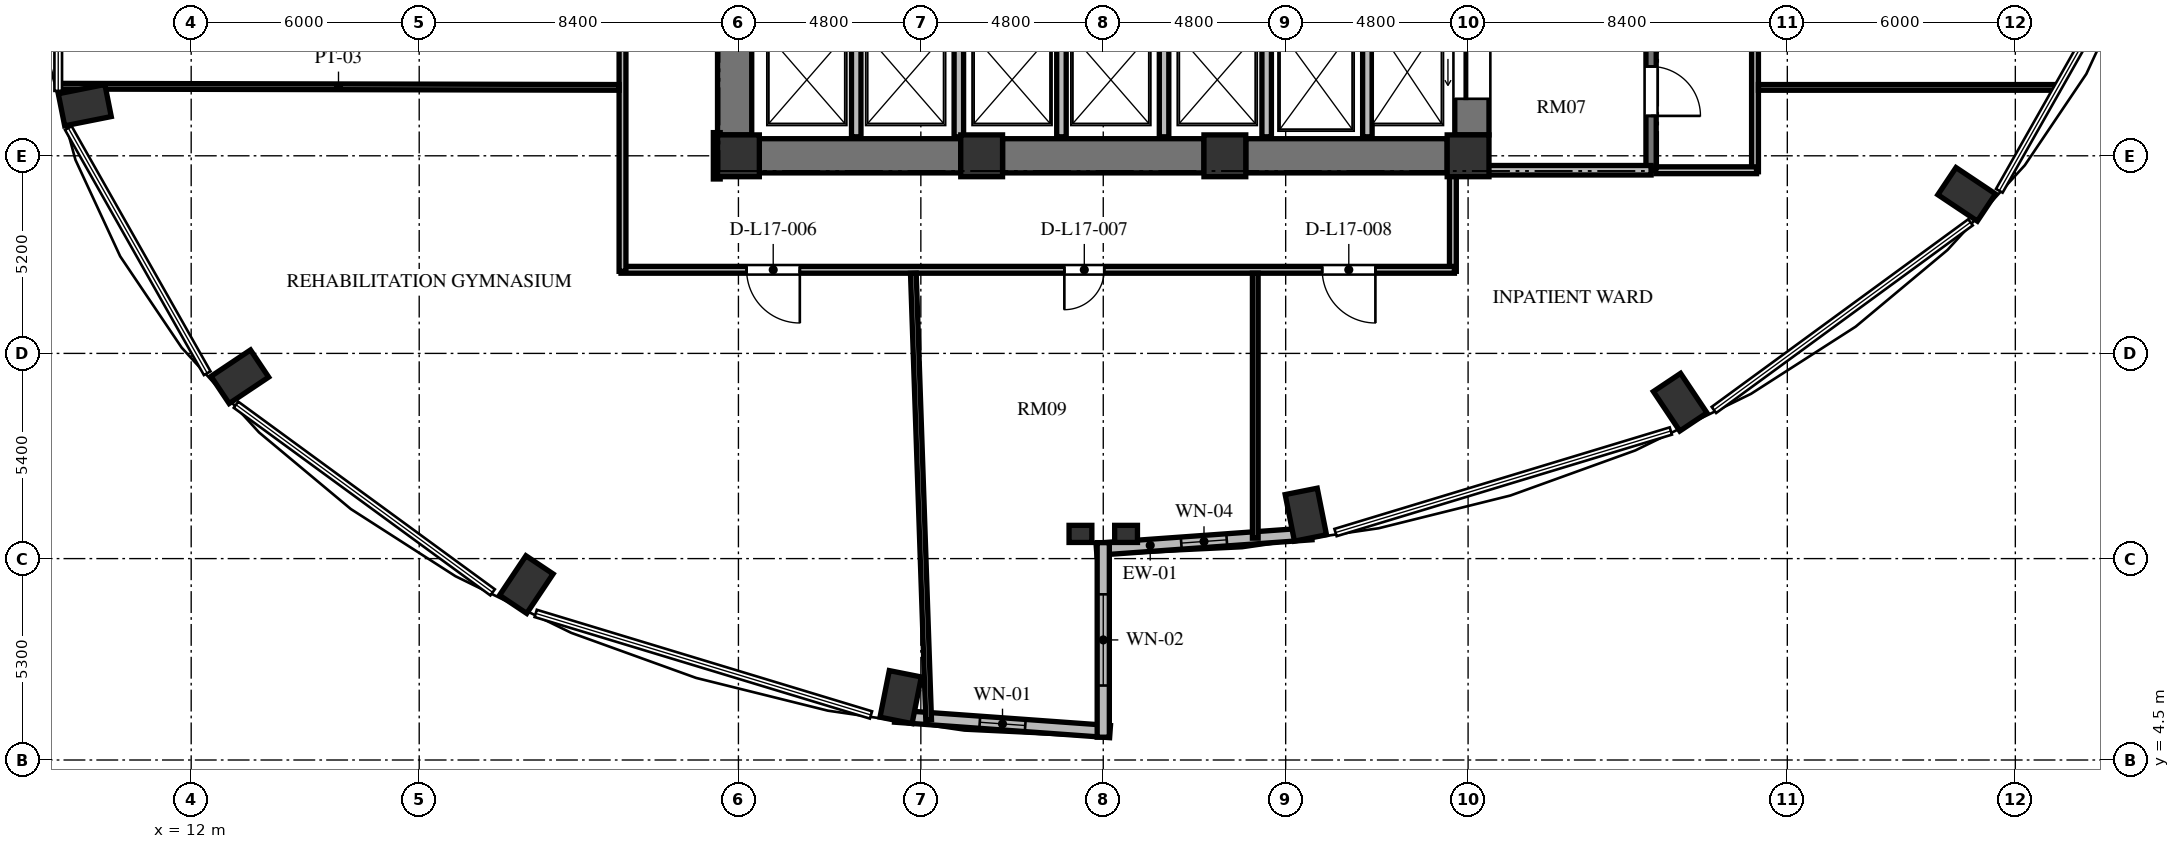
"""IFC4 building model, lengths in metres.
Left out: names, types, materials, properties, quantities, classifications, styles, units other than length and angle.
Written with IfcOpenShell. Run it as: python <this file> out.ifc"""

import sys

from ifc_helpers import new_model, si_unit, direction, frame, frame_2d, origin, origin_2d, place, context, subcontext, project, spatial, rectangle, extrude, element, fill, save


model = new_model("IFC4")
c1 = context("Model", 3, precision=1e-05, world=origin(), true_north=direction((0.0, 1.0)))
c2 = subcontext(c1, "Body", "Model", "MODEL_VIEW")
j1 = project(units=[si_unit("LENGTHUNIT", "METRE"), si_unit("PLANEANGLEUNIT", "RADIAN")], contexts=[c1])
p1 = place(None, origin())
s1 = spatial("IfcSite", under=j1, at=p1, CompositionType="ELEMENT")
p2 = place(p1, origin())
s2 = spatial("IfcBuilding", under=s1, at=p2, CompositionType="ELEMENT")
p3 = place(p2, frame((0.0, 0.0, 68.976)))
s3 = spatial("IfcBuildingStorey", under=s2, at=p3, CompositionType="ELEMENT", Elevation=68.976)
for number, where, z_axis, x_axis in (
    (1, (41.331, 10.956, 0.0), (0.0, 0.0, 1.0), (0.195, -0.981, 0.0)),
    (2, (51.181, 13.916, 0.0), (0.0, 0.0, 1.0), (0.556, -0.831, 0.0)),
    (3, (58.72, 19.386, 0.0), (0.0, 0.0, 1.0), (0.831, -0.556, 0.0)),
    (4, (9.2, 21.732, 0.0), (0.0, 0.0, 1.0), (-0.981, -0.195, 0.0)),
    (5, (13.28, 14.586, 0.0), (0.0, 0.0, 1.0), (-0.831, -0.556, 0.0)),
    (6, (20.819, 9.116, 0.0), (0.0, 0.0, 1.0), (-0.556, -0.831, 0.0)),
    (7, (30.669, 6.156, 0.0), (0.0, 0.0, 1.0), (-0.195, -0.981, 0.0)),
):
    element("IfcColumn", number, at=place(p3, frame(where, z_axis=z_axis, x_axis=x_axis)), inside=s3, PredefinedType="COLUMN", context=c2, shape_type="SweptSolid", body=[
        extrude(rectangle(XDim=1.25, YDim=0.86, at=origin_2d()), origin(), (0.0, 0.0, 1.0), 3.648),
    ])
for number, where, z_axis, x_axis in (
    (8, (26.4, 20.4, 0.0), (0.0, 0.0, 1.0), (1.0, 0.0, 0.0)),
    (9, (32.8, 20.4, 0.0), (0.0, 0.0, 1.0), (1.0, 0.0, 0.0)),
    (10, (39.2, 20.4, 0.0), (0.0, 0.0, 1.0), (1.0, 0.0, 0.0)),
    (11, (45.6, 20.4, 0.0), (0.0, 0.0, 1.0), (1.0, 0.0, 0.0)),
):
    element("IfcColumn", number, at=place(p3, frame(where, z_axis=z_axis, x_axis=x_axis)), inside=s3, PredefinedType="COLUMN", context=c2, shape_type="SweptSolid", body=[
        extrude(rectangle(XDim=1.1, YDim=1.1, at=origin_2d()), origin(), (0.0, 0.0, 1.0), 3.648),
    ])
for number, where, z_axis, x_axis in (
    (12, (35.4, 10.45, 0.0), (0.0, 0.0, 1.0), (1.0, 0.0, 0.0)),
    (13, (36.6, 10.45, 0.0), (0.0, 0.0, 1.0), (1.0, 0.0, 0.0)),
):
    element("IfcColumn", number, at=place(p3, frame(where, z_axis=z_axis, x_axis=x_axis)), inside=s3, PredefinedType="PILASTER", context=c2, shape_type="SweptSolid", body=[
        extrude(rectangle(XDim=0.6, YDim=0.45, at=origin_2d()), origin(), (0.0, 0.0, 1.0), 3.648),
    ])
p4 = place(p3, frame((26.3, 20.95, 0.0), z_axis=(0.0, 0.0, 1.0), x_axis=(0.0, 1.0, 0.0)))
e14 = element("IfcWall", 14, at=p4, inside=s3, PredefinedType="SHEAR", context=c2, shape_type="SweptSolid", body=[
    extrude(rectangle(XDim=14.1, YDim=0.9, at=frame_2d((7.05, 0.0))), origin(), (0.0, 0.0, 1.0), 3.648),
])
p5 = place(p4, frame((6.5, 0.0, 0.0)))
e15 = element("IfcOpeningElement", 15, at=p5, cuts=e14, PredefinedType="OPENING", context=c2, shape_type="SweptSolid", body=[
    extrude(rectangle(XDim=1.2, YDim=2.15, at=frame_2d((0.6, 1.075))), frame((0.0, 0.46, 0.0), z_axis=(0.0, -1.0, 0.0), x_axis=(1.0, 0.0, 0.0)), (0.0, 0.0, 1.0), 0.92),
])
p6 = place(p4, frame((9.6, 0.0, 0.0)))
e16 = element("IfcOpeningElement", 16, at=p6, cuts=e14, PredefinedType="OPENING", context=c2, shape_type="SweptSolid", body=[
    extrude(rectangle(XDim=1.3, YDim=2.2, at=frame_2d((0.65, 1.1))), frame((0.0, 0.46, 0.0), z_axis=(0.0, -1.0, 0.0), x_axis=(1.0, 0.0, 0.0)), (0.0, 0.0, 1.0), 0.92),
])
p7 = place(p4, frame((3.26, 0.0, 0.0)))
e17 = element("IfcOpeningElement", 17, at=p7, cuts=e14, PredefinedType="OPENING", context=c2, shape_type="SweptSolid", body=[
    extrude(rectangle(XDim=1.3, YDim=2.2, at=frame_2d((0.65, 1.1))), frame((0.0, 0.46, 0.0), z_axis=(0.0, -1.0, 0.0), x_axis=(1.0, 0.0, 0.0)), (0.0, 0.0, 1.0), 0.92),
])
p8 = place(p3, frame((45.7, 20.95, 0.0), z_axis=(0.0, 0.0, 1.0), x_axis=(0.0, 1.0, 0.0)))
e18 = element("IfcWall", 18, at=p8, inside=s3, PredefinedType="SHEAR", context=c2, shape_type="SweptSolid", body=[
    extrude(rectangle(XDim=14.1, YDim=0.9, at=frame_2d((7.05, 0.0))), origin(), (0.0, 0.0, 1.0), 3.648),
])
p9 = place(p8, frame((11.75, 0.0, 0.0)))
e19 = element("IfcOpeningElement", 19, at=p9, cuts=e18, PredefinedType="OPENING", context=c2, shape_type="SweptSolid", body=[
    extrude(rectangle(XDim=1.4, YDim=2.3, at=frame_2d((0.7, 1.15))), frame((0.0, 0.46, 0.0), z_axis=(0.0, -1.0, 0.0), x_axis=(1.0, 0.0, 0.0)), (0.0, 0.0, 1.0), 0.92),
])
p10 = place(p8, frame((0.95, 0.0, 0.0)))
e20 = element("IfcOpeningElement", 20, at=p10, cuts=e18, PredefinedType="OPENING", context=c2, shape_type="SweptSolid", body=[
    extrude(rectangle(XDim=1.4, YDim=2.3, at=frame_2d((0.7, 1.15))), frame((0.0, 0.46, 0.0), z_axis=(0.0, -1.0, 0.0), x_axis=(1.0, 0.0, 0.0)), (0.0, 0.0, 1.0), 0.92),
])
p11 = place(p3, frame((26.95, 20.4, 0.0), z_axis=(0.0, 0.0, 1.0), x_axis=(1.0, 0.0, 0.0)))
e21 = element("IfcWall", 21, at=p11, inside=s3, PredefinedType="SHEAR", context=c2, shape_type="SweptSolid", body=[
    extrude(rectangle(XDim=5.3, YDim=0.9, at=frame_2d((2.65, 0.0))), origin(), (0.0, 0.0, 1.0), 3.648),
])
p12 = place(p3, frame((33.35, 20.4, 0.0), z_axis=(0.0, 0.0, 1.0), x_axis=(1.0, 0.0, 0.0)))
e22 = element("IfcWall", 22, at=p12, inside=s3, PredefinedType="SHEAR", context=c2, shape_type="SweptSolid", body=[
    extrude(rectangle(XDim=5.3, YDim=0.9, at=frame_2d((2.65, 0.0))), origin(), (0.0, 0.0, 1.0), 3.648),
])
p13 = place(p3, frame((39.75, 20.4, 0.0), z_axis=(0.0, 0.0, 1.0), x_axis=(1.0, 0.0, 0.0)))
e23 = element("IfcWall", 23, at=p13, inside=s3, PredefinedType="SHEAR", context=c2, shape_type="SweptSolid", body=[
    extrude(rectangle(XDim=5.3, YDim=0.9, at=frame_2d((2.65, 0.0))), origin(), (0.0, 0.0, 1.0), 3.648),
])
p14 = place(p3, frame((35.821, 10.047, 0.0), z_axis=(0.0, 0.0, 1.0), x_axis=(0.997422321809, 0.071754525696, 0.0)))
e24 = element("IfcWall", 24, at=p14, inside=s3, PredefinedType="SOLIDWALL", context=c2, shape_type="SweptSolid", body=[
    extrude(rectangle(XDim=5.675, YDim=0.32, at=frame_2d((2.838, 0.0))), origin(), (0.0, 0.0, 1.0), 3.428),
])
p15 = place(p14, frame((2.238, 0.0, 0.85)))
e25 = element("IfcOpeningElement", 25, at=p15, cuts=e24, PredefinedType="OPENING", context=c2, shape_type="SweptSolid", body=[
    extrude(rectangle(XDim=1.2, YDim=1.8, at=frame_2d((0.6, 0.9))), frame((0.0, 0.17, 0.0), z_axis=(0.0, -1.0, 0.0), x_axis=(1.0, 0.0, 0.0)), (0.0, 0.0, 1.0), 0.34),
])
p16 = place(p3, frame((30.519, 5.654, 0.0), z_axis=(0.0, 0.0, 1.0), x_axis=(0.997421878774, -0.071760683825, 0.0)))
e26 = element("IfcWall", 26, at=p16, inside=s3, PredefinedType="SOLIDWALL", context=c2, shape_type="SweptSolid", body=[
    extrude(rectangle(XDim=5.675, YDim=0.32, at=frame_2d((2.837, 0.0))), origin(), (0.0, 0.0, 1.0), 3.428),
])
p17 = place(p16, frame((2.237, 0.0, 0.85)))
e27 = element("IfcOpeningElement", 27, at=p17, cuts=e26, PredefinedType="OPENING", context=c2, shape_type="SweptSolid", body=[
    extrude(rectangle(XDim=1.2, YDim=2.2, at=frame_2d((0.6, 1.1))), frame((0.0, 0.17, 0.0), z_axis=(0.0, -1.0, 0.0), x_axis=(1.0, 0.0, 0.0)), (0.0, 0.0, 1.0), 0.34),
])
p18 = place(p3, frame((36.0, 5.1, 0.0), z_axis=(0.0, 0.0, 1.0), x_axis=(0.0, 1.0, 0.0)))
e28 = element("IfcWall", 28, at=p18, inside=s3, PredefinedType="SOLIDWALL", context=c2, shape_type="SweptSolid", body=[
    extrude(rectangle(XDim=5.12, YDim=0.32, at=frame_2d((2.56, 0.0))), origin(), (0.0, 0.0, 1.0), 3.428),
])
p19 = place(p18, frame((1.36, 0.0, 0.84)))
e29 = element("IfcOpeningElement", 29, at=p19, cuts=e28, PredefinedType="OPENING", context=c2, shape_type="SweptSolid", body=[
    extrude(rectangle(XDim=2.4, YDim=2.04, at=frame_2d((1.2, 1.02))), frame((0.0, 0.17, 0.0), z_axis=(0.0, -1.0, 0.0), x_axis=(1.0, 0.0, 0.0)), (0.0, 0.0, 1.0), 0.34),
])
p20 = place(p3, frame((42.95, 20.9, 0.0), z_axis=(0.0, 0.0, 1.0), x_axis=(0.0, 1.0, 0.0)))
e30 = element("IfcWall", 30, at=p20, inside=s3, PredefinedType="SOLIDWALL", context=c2, shape_type="SweptSolid", body=[
    extrude(rectangle(XDim=3.2, YDim=0.25, at=frame_2d((1.6, 0.0))), origin(), (0.0, 0.0, 1.0), 3.428),
])
for number, where, z_axis, x_axis in (
    (31, (29.5, 20.9, 0.0), (0.0, 0.0, 1.0), (0.0, 1.0, 0.0)),
    (32, (32.2, 20.9, 0.0), (0.0, 0.0, 1.0), (0.0, 1.0, 0.0)),
    (33, (34.9, 20.9, 0.0), (0.0, 0.0, 1.0), (0.0, 1.0, 0.0)),
    (34, (37.6, 20.9, 0.0), (0.0, 0.0, 1.0), (0.0, 1.0, 0.0)),
    (35, (40.3, 20.9, 0.0), (0.0, 0.0, 1.0), (0.0, 1.0, 0.0)),
):
    element("IfcWall", number, at=place(p3, frame(where, z_axis=z_axis, x_axis=x_axis)), inside=s3, PredefinedType="SOLIDWALL", context=c2, shape_type="SweptSolid", body=[
        extrude(rectangle(XDim=2.8, YDim=0.25, at=frame_2d((1.4, 0.0))), origin(), (0.0, 0.0, 1.0), 3.428),
    ])
p21 = place(p3, frame((50.415, 35.845, 0.0), z_axis=(0.0, 0.0, 1.0), x_axis=(0.0, -1.0, 0.0)))
e36 = element("IfcWall", 36, at=p21, inside=s3, PredefinedType="SHEAR", context=c2, shape_type="SweptSolid", body=[
    extrude(rectangle(XDim=15.825, YDim=0.27, at=frame_2d((7.913, 0.0))), origin(), (0.0, 0.0, 1.0), 3.648),
])
p22 = place(p21, frame((4.445, 0.0, 0.0)))
e37 = element("IfcOpeningElement", 37, at=p22, cuts=e36, PredefinedType="OPENING", context=c2, shape_type="SweptSolid", body=[
    extrude(rectangle(XDim=1.2, YDim=2.15, at=frame_2d((0.6, 1.075))), frame((0.0, 0.145, 0.0), z_axis=(0.0, -1.0, 0.0), x_axis=(1.0, 0.0, 0.0)), (0.0, 0.0, 1.0), 0.29),
])
p23 = place(p21, frame((1.295, 0.0, 0.0)))
e38 = element("IfcOpeningElement", 38, at=p23, cuts=e36, PredefinedType="OPENING", context=c2, shape_type="SweptSolid", body=[
    extrude(rectangle(XDim=1.3, YDim=2.2, at=frame_2d((0.65, 1.1))), frame((0.0, 0.145, 0.0), z_axis=(0.0, -1.0, 0.0), x_axis=(1.0, 0.0, 0.0)), (0.0, 0.0, 1.0), 0.29),
])
p24 = place(p21, frame((13.095, 0.0, 0.0)))
e39 = element("IfcOpeningElement", 39, at=p24, cuts=e36, PredefinedType="OPENING", context=c2, shape_type="SweptSolid", body=[
    extrude(rectangle(XDim=1.3, YDim=2.2, at=frame_2d((0.65, 1.1))), frame((0.0, 0.145, 0.0), z_axis=(0.0, -1.0, 0.0), x_axis=(1.0, 0.0, 0.0)), (0.0, 0.0, 1.0), 0.29),
])
p25 = place(p3, frame((45.7, 20.02, 0.0), z_axis=(0.0, 0.0, 1.0), x_axis=(1.0, 0.0, 0.0)))
e40 = element("IfcWall", 40, at=p25, inside=s3, PredefinedType="SOLIDWALL", context=c2, shape_type="SweptSolid", body=[
    extrude(rectangle(XDim=4.715, YDim=0.25, at=frame_2d((2.357, 0.0))), origin(), (0.0, 0.0, 1.0), 2.813),
])
p26 = place(p3, frame((53.15, 26.64, 0.0), z_axis=(0.0, 0.0, 1.0), x_axis=(0.0, -1.0, 0.0)))
e41 = element("IfcWall", 41, at=p26, inside=s3, PredefinedType="PARTITIONING", context=c2, shape_type="SweptSolid", body=[
    extrude(rectangle(XDim=6.66, YDim=0.18, at=frame_2d((3.33, 0.0))), origin(), (0.0, 0.0, 1.0), 3.428),
])
p27 = place(p3, frame((53.19, 20.02, 0.0), z_axis=(0.0, 0.0, 1.0), x_axis=(-1.0, 0.0, 0.0)))
e42 = element("IfcWall", 42, at=p27, inside=s3, PredefinedType="PARTITIONING", context=c2, shape_type="SweptSolid", body=[
    extrude(rectangle(XDim=2.65, YDim=0.18, at=frame_2d((1.325, 0.0))), origin(), (0.0, 0.0, 1.0), 2.813),
])
p28 = place(p3, frame((25.83, 21.01, 0.0), z_axis=(0.0, 0.0, 1.0), x_axis=(0.0, -1.0, 0.0)))
e43 = element("IfcWall", 43, at=p28, inside=s3, PredefinedType="PARTITIONING", context=c2, shape_type="SweptSolid", body=[
    extrude(rectangle(XDim=1.22, YDim=0.18, at=frame_2d((0.61, 0.0))), origin(), (0.0, 0.0, 1.0), 3.428),
])
p29 = place(p3, frame((45.2, 19.91, 0.0), z_axis=(0.0, 0.0, 1.0), x_axis=(0.0, -1.0, 0.0)))
e44 = element("IfcWall", 44, at=p29, inside=s3, PredefinedType="PARTITIONING", context=c2, shape_type="SweptSolid", body=[
    extrude(rectangle(XDim=2.55, YDim=0.18, at=frame_2d((1.275, 0.0))), origin(), (0.0, 0.0, 1.0), 3.428),
])
p30 = place(p3, frame((45.24, 17.4, 0.0), z_axis=(0.0, 0.0, 1.0), x_axis=(-1.0, 0.0, 0.0)))
e45 = element("IfcWall", 45, at=p30, inside=s3, PredefinedType="PARTITIONING", context=c2, shape_type="SweptSolid", body=[
    extrude(rectangle(XDim=21.93, YDim=0.18, at=frame_2d((10.965, 0.0))), origin(), (0.0, 0.0, 1.0), 3.053),
])
p31 = place(p30, frame((17.225, 0.0, 0.0)))
e46 = element("IfcOpeningElement", 46, at=p31, cuts=e45, PredefinedType="OPENING", context=c2, shape_type="SweptSolid", body=[
    extrude(rectangle(XDim=1.4, YDim=2.2, at=frame_2d((0.7, 1.1))), frame((0.0, 0.1, 0.0), z_axis=(0.0, -1.0, 0.0), x_axis=(1.0, 0.0, 0.0)), (0.0, 0.0, 1.0), 0.2),
])
p32 = place(p30, frame((9.214, 0.0, 0.0)))
e47 = element("IfcOpeningElement", 47, at=p32, cuts=e45, PredefinedType="OPENING", context=c2, shape_type="SweptSolid", body=[
    extrude(rectangle(XDim=1.05, YDim=2.15, at=frame_2d((0.525, 1.075))), frame((0.0, 0.1, 0.0), z_axis=(0.0, -1.0, 0.0), x_axis=(1.0, 0.0, 0.0)), (0.0, 0.0, 1.0), 0.2),
])
p33 = place(p30, frame((2.079, 0.0, 0.0)))
e48 = element("IfcOpeningElement", 48, at=p33, cuts=e45, PredefinedType="OPENING", context=c2, shape_type="SweptSolid", body=[
    extrude(rectangle(XDim=1.4, YDim=2.2, at=frame_2d((0.7, 1.1))), frame((0.0, 0.1, 0.0), z_axis=(0.0, -1.0, 0.0), x_axis=(1.0, 0.0, 0.0)), (0.0, 0.0, 1.0), 0.2),
])
p34 = place(p3, frame((23.35, 17.36, 0.0), z_axis=(0.0, 0.0, 1.0), x_axis=(0.0, 1.0, 0.0)))
e49 = element("IfcWall", 49, at=p34, inside=s3, PredefinedType="PARTITIONING", context=c2, shape_type="SweptSolid", body=[
    extrude(rectangle(XDim=9.28, YDim=0.18, at=frame_2d((4.64, 0.0))), origin(), (0.0, 0.0, 1.0), 3.428),
])
p35 = place(p3, frame((8.493, 22.231, 0.0), z_axis=(0.0, 0.0, 1.0), x_axis=(0.999997760873, -0.002116187438, 0.0)))
e50 = element("IfcWall", 50, at=p35, inside=s3, PredefinedType="PARTITIONING", context=c2, shape_type="SweptSolid", body=[
    extrude(rectangle(XDim=14.767, YDim=0.15, at=frame_2d((7.384, 0.0))), origin(), (0.0, 0.0, 1.0), 3.428),
])
p36 = place(p3, frame((53.24, 22.2, 0.0), z_axis=(0.0, 0.0, 1.0), x_axis=(1.0, 0.0, 0.0)))
e51 = element("IfcWall", 51, at=p36, inside=s3, PredefinedType="PARTITIONING", context=c2, shape_type="SweptSolid", body=[
    extrude(rectangle(XDim=7.875, YDim=0.15, at=frame_2d((3.938, 0.0))), origin(), (0.0, 0.0, 1.0), 3.428),
])
p37 = place(p3, frame((31.405, 5.559, 0.0), z_axis=(0.0, 0.0, 1.0), x_axis=(-0.034219123574, 0.9994143543, 0.0)))
e52 = element("IfcWall", 52, at=p37, inside=s3, PredefinedType="PARTITIONING", context=c2, shape_type="SweptSolid", body=[
    extrude(rectangle(XDim=11.758, YDim=0.15, at=frame_2d((5.879, 0.0))), origin(), (0.0, 0.0, 1.0), 2.813),
])
p38 = place(p3, frame((40.0, 10.338, 0.0), z_axis=(0.0, 0.0, 1.0), x_axis=(0.0, 1.0, 0.0)))
e53 = element("IfcWall", 53, at=p38, inside=s3, PredefinedType="PARTITIONING", context=c2, shape_type="SweptSolid", body=[
    extrude(rectangle(XDim=6.972, YDim=0.15, at=frame_2d((3.486, 0.0))), origin(), (0.0, 0.0, 1.0), 2.813),
])
p39 = place(p15, origin())
e54 = element("IfcWindow", 54, at=p39, inside=s3, PartitioningType="SINGLE_PANEL", PredefinedType="WINDOW", context=c2, shape_type="SweptSolid", body=[
    extrude(rectangle(XDim=1.2, YDim=1.8, at=frame_2d((0.6, 0.9))), frame((0.0, 0.03, 0.0), z_axis=(0.0, -1.0, 0.0), x_axis=(1.0, 0.0, 0.0)), (0.0, 0.0, 1.0), 0.06),
])
fill(e25, e54)
p40 = place(p17, origin())
e55 = element("IfcWindow", 55, at=p40, inside=s3, PartitioningType="SINGLE_PANEL", PredefinedType="WINDOW", context=c2, shape_type="SweptSolid", body=[
    extrude(rectangle(XDim=1.2, YDim=2.2, at=frame_2d((0.6, 1.1))), frame((0.0, 0.03, 0.0), z_axis=(0.0, -1.0, 0.0), x_axis=(1.0, 0.0, 0.0)), (0.0, 0.0, 1.0), 0.06),
])
fill(e27, e55)
p41 = place(p19, origin())
e56 = element("IfcWindow", 56, at=p41, inside=s3, PartitioningType="SINGLE_PANEL", PredefinedType="WINDOW", context=c2, shape_type="SweptSolid", body=[
    extrude(rectangle(XDim=2.4, YDim=2.04, at=frame_2d((1.2, 1.02))), frame((0.0, 0.03, 0.0), z_axis=(0.0, -1.0, 0.0), x_axis=(1.0, 0.0, 0.0)), (0.0, 0.0, 1.0), 0.06),
])
fill(e29, e56)
p42 = place(p10, origin())
e57 = element("IfcDoor", 57, at=p42, inside=s3, OperationType="SLIDING_TO_LEFT", PredefinedType="DOOR", context=c2, shape_type="SweptSolid", body=[
    extrude(rectangle(XDim=1.4, YDim=2.3, at=frame_2d((0.7, 1.15))), frame((0.0, 0.025, 0.0), z_axis=(0.0, -1.0, 0.0), x_axis=(1.0, 0.0, 0.0)), (0.0, 0.0, 1.0), 0.05),
])
fill(e20, e57)
p43 = place(p24, origin())
e58 = element("IfcDoor", 58, at=p43, inside=s3, OperationType="SINGLE_SWING_RIGHT", PredefinedType="DOOR", context=c2, shape_type="SweptSolid", body=[
    extrude(rectangle(XDim=1.3, YDim=2.2, at=frame_2d((0.65, 1.1))), frame((0.0, 0.025, 0.0), z_axis=(0.0, -1.0, 0.0), x_axis=(1.0, 0.0, 0.0)), (0.0, 0.0, 1.0), 0.05),
])
fill(e39, e58)
p44 = place(p31, origin())
e59 = element("IfcDoor", 59, at=p44, inside=s3, OperationType="SINGLE_SWING_LEFT", PredefinedType="DOOR", context=c2, shape_type="SweptSolid", body=[
    extrude(rectangle(XDim=1.4, YDim=2.2, at=frame_2d((0.7, 1.1))), frame((0.0, 0.025, 0.0), z_axis=(0.0, -1.0, 0.0), x_axis=(1.0, 0.0, 0.0)), (0.0, 0.0, 1.0), 0.05),
])
fill(e46, e59)
p45 = place(p32, origin())
e60 = element("IfcDoor", 60, at=p45, inside=s3, OperationType="SINGLE_SWING_RIGHT", PredefinedType="DOOR", context=c2, shape_type="SweptSolid", body=[
    extrude(rectangle(XDim=1.05, YDim=2.15, at=frame_2d((0.525, 1.075))), frame((0.0, 0.025, 0.0), z_axis=(0.0, -1.0, 0.0), x_axis=(1.0, 0.0, 0.0)), (0.0, 0.0, 1.0), 0.05),
])
fill(e47, e60)
p46 = place(p33, origin())
e61 = element("IfcDoor", 61, at=p46, inside=s3, OperationType="SINGLE_SWING_LEFT", PredefinedType="DOOR", context=c2, shape_type="SweptSolid", body=[
    extrude(rectangle(XDim=1.4, YDim=2.2, at=frame_2d((0.7, 1.1))), frame((0.0, 0.025, 0.0), z_axis=(0.0, -1.0, 0.0), x_axis=(1.0, 0.0, 0.0)), (0.0, 0.0, 1.0), 0.05),
])
fill(e48, e61)
save(model, sys.argv[1])
